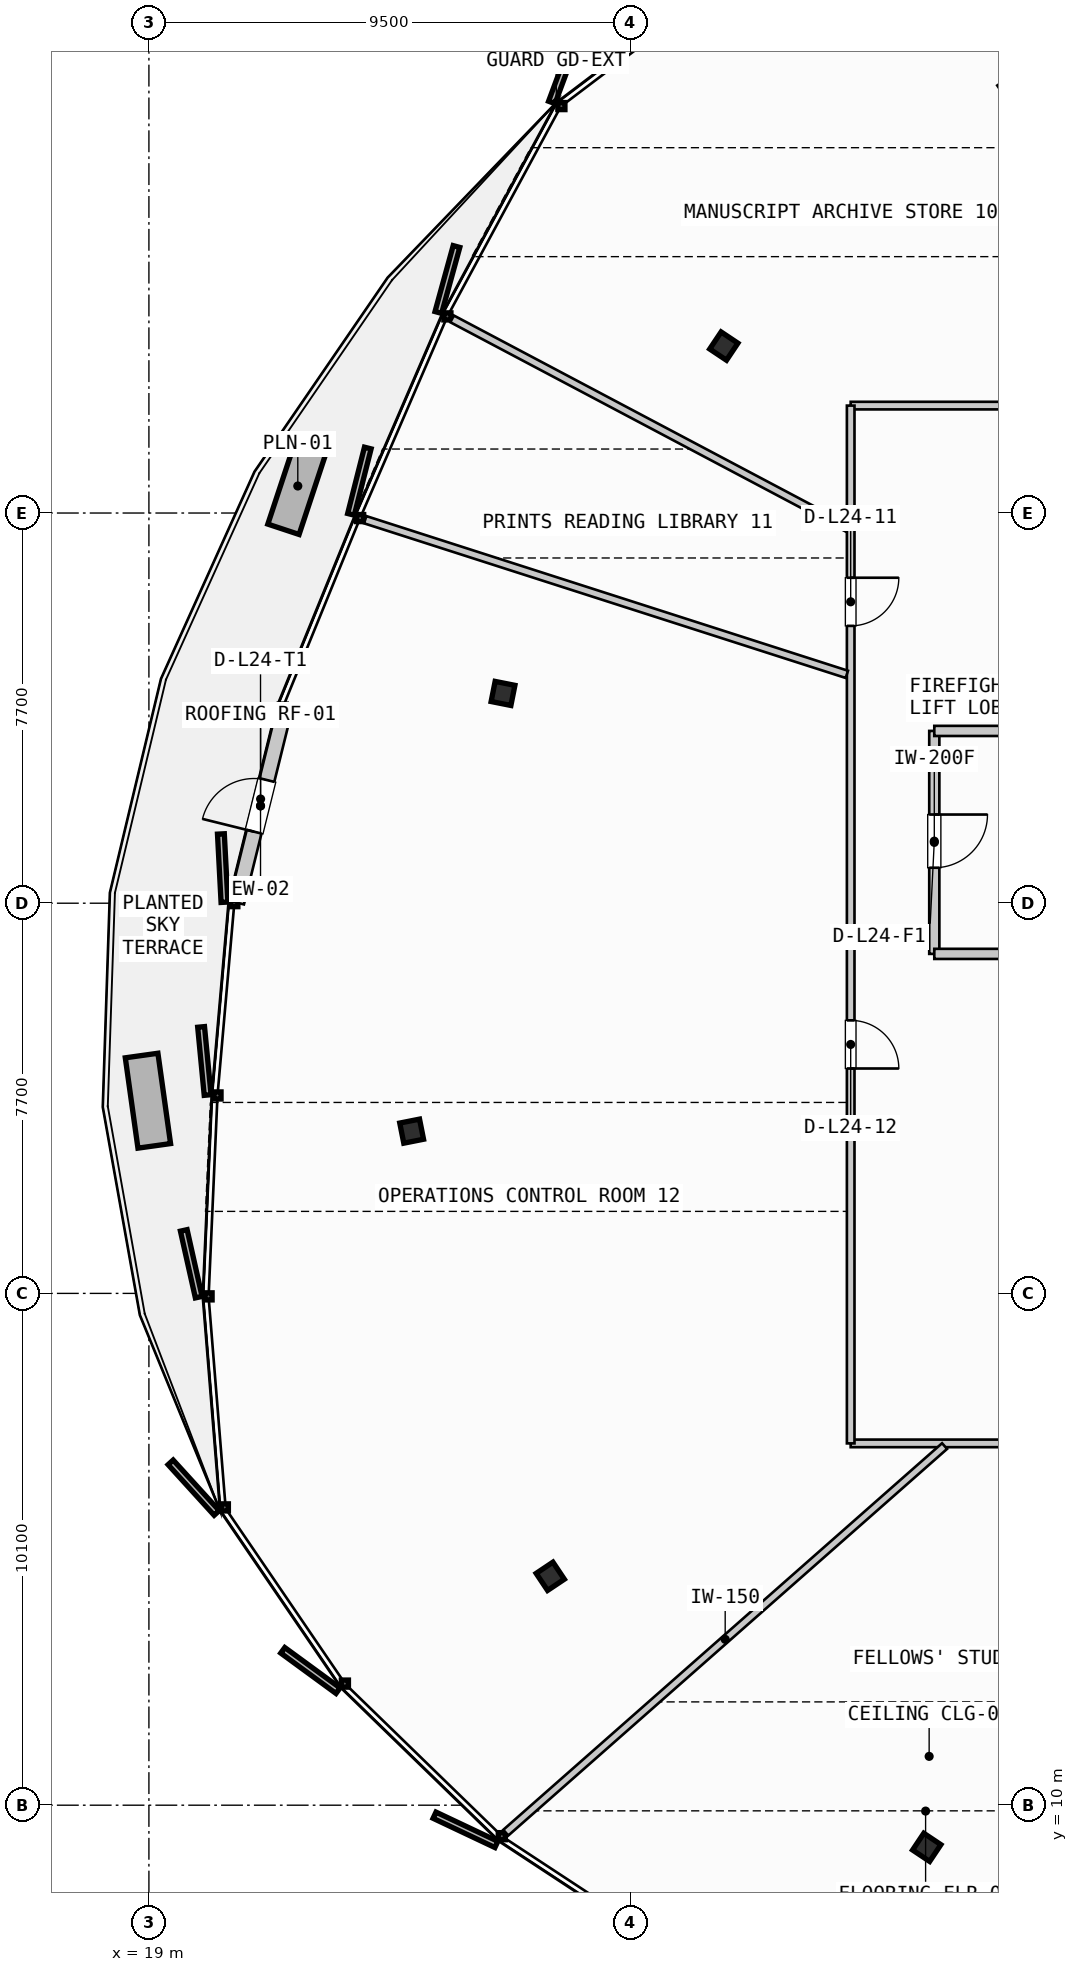
"""IFC4 building model, lengths in metres.
Left out: names, types, materials, properties, quantities, classifications, styles, units other than length and angle.
Written with IfcOpenShell. Run it as: python <this file> out.ifc"""

import sys

from ifc_helpers import new_model, si_unit, direction, frame, frame_2d, origin, origin_2d, place, context, subcontext, project, spatial, rectangle, i_section, extrude, source, transform, mapped, element, fill, save


model = new_model("IFC4")
c1 = context("Model", 3, precision=1e-05, world=origin(), true_north=direction((0.0, 1.0)))
c2 = subcontext(c1, "Body", "Model", "MODEL_VIEW")
j1 = project(units=[si_unit("LENGTHUNIT", "METRE"), si_unit("PLANEANGLEUNIT", "RADIAN")], contexts=[c1])
p1 = place(None, origin())
s1 = spatial("IfcSite", under=j1, at=p1, CompositionType="ELEMENT")
p2 = place(p1, origin())
s2 = spatial("IfcBuilding", under=s1, at=p2, CompositionType="ELEMENT")
p3 = place(p2, frame((0.0, 0.0, 100.0)))
s3 = spatial("IfcBuildingStorey", under=s2, at=p3, CompositionType="ELEMENT", Elevation=100.0)
m1 = source(origin(), c2, "Body", "SweptSolid", [
    extrude(i_section(OverallWidth=0.405, OverallDepth=0.398, WebThickness=0.035, FlangeThickness=0.056, FilletRadius=0.015, at=origin_2d()), origin(), (0.0, 0.0, 1.0), 3.35),
])
for number, where, z_axis, x_axis in (
    (1, (30.346, 38.794, 0.0), (0.0, 0.0, 1.0), (-0.831, 0.556, 0.0)),
    (2, (25.989, 31.94, 0.0), (0.0, 0.0, 1.0), (-0.981, 0.195, 0.0)),
    (3, (24.185, 23.302, 0.0), (0.0, 0.0, 1.0), (-0.981, -0.195, 0.0)),
    (4, (26.921, 14.517, 0.0), (0.0, 0.0, 1.0), (-0.831, -0.556, 0.0)),
    (5, (34.351, 9.168, 0.0), (0.0, 0.0, 1.0), (-0.556, -0.831, 0.0)),
):
    element("IfcColumn", number, at=place(p3, frame(where, z_axis=z_axis, x_axis=x_axis)), inside=s3, PredefinedType="COLUMN", context=c2, shape_type="MappedRepresentation", body=[
        mapped(m1, transform((0.0, 0.0, 0.0), scale=1.0)),
    ])
p4 = place(p3, frame((20.73, 27.812, 0.0), z_axis=(0.0, 0.0, 1.0), x_axis=(0.240490163951, 0.970651575512, 0.0)))
e6 = element("IfcWall", 6, at=p4, inside=s3, PredefinedType="SOLIDWALL", context=c2, shape_type="SweptSolid", body=[
    extrude(rectangle(XDim=3.933, YDim=0.3, at=frame_2d((1.966, 0.0))), origin(), (0.0, 0.0, 1.0), 2.775),
])
p5 = place(p4, frame((1.441, 0.0, 0.0)))
e7 = element("IfcOpeningElement", 7, at=p5, cuts=e6, PredefinedType="OPENING", context=c2, shape_type="SweptSolid", body=[
    extrude(rectangle(XDim=1.05, YDim=2.2, at=frame_2d((0.525, 1.1))), frame((0.0, 0.16, 0.0), z_axis=(0.0, -1.0, 0.0), x_axis=(1.0, 0.0, 0.0)), (0.0, 0.0, 1.0), 0.32),
])
p6 = place(p3, frame((34.5, 31.2, 0.0), z_axis=(0.0, 0.0, 1.0), x_axis=(0.0, -1.0, 0.0)))
e8 = element("IfcWall", 8, at=p6, inside=s3, PredefinedType="PARTITIONING", context=c2, shape_type="SweptSolid", body=[
    extrude(rectangle(XDim=4.4, YDim=0.2, at=frame_2d((2.2, 0.0))), origin(), (0.0, 0.0, 1.0), 2.28),
])
p7 = place(p6, frame((1.65, 0.0, 0.0)))
e9 = element("IfcOpeningElement", 9, at=p7, cuts=e8, PredefinedType="OPENING", context=c2, shape_type="SweptSolid", body=[
    extrude(rectangle(XDim=1.05, YDim=2.15, at=frame_2d((0.525, 1.075))), frame((0.0, 0.11, 0.0), z_axis=(0.0, -1.0, 0.0), x_axis=(1.0, 0.0, 0.0)), (0.0, 0.0, 1.0), 0.22),
])
for number, where, z_axis, x_axis in (
    (10, (34.5, 26.8, 0.0), (0.0, 0.0, 1.0), (1.0, 0.0, 0.0)),
    (11, (34.5, 31.2, 0.0), (0.0, 0.0, 1.0), (1.0, 0.0, 0.0)),
):
    element("IfcWall", number, at=place(p3, frame(where, z_axis=z_axis, x_axis=x_axis)), inside=s3, PredefinedType="PARTITIONING", context=c2, shape_type="SweptSolid", body=[
        extrude(rectangle(XDim=3.215, YDim=0.2, at=frame_2d((1.607, 0.0))), origin(), (0.0, 0.0, 1.0), 2.28),
    ])
p8 = place(p3, frame((32.85, 17.14, 0.0), z_axis=(0.0, 0.0, 1.0), x_axis=(1.0, 0.0, 0.0)))
e12 = element("IfcWall", 12, at=p8, inside=s3, PredefinedType="PARTITIONING", context=c2, shape_type="SweptSolid", body=[
    extrude(rectangle(XDim=28.42, YDim=0.15, at=frame_2d((14.21, 0.0))), origin(), (0.0, 0.0, 1.0), 2.28),
])
p9 = place(p8, frame((5.554, 0.0, 0.0)))
e13 = element("IfcOpeningElement", 13, at=p9, cuts=e12, PredefinedType="OPENING", context=c2, shape_type="SweptSolid", body=[
    extrude(rectangle(XDim=0.95, YDim=2.15, at=frame_2d((0.475, 1.075))), frame((0.0, 0.085, 0.0), z_axis=(0.0, -1.0, 0.0), x_axis=(1.0, 0.0, 0.0)), (0.0, 0.0, 1.0), 0.17),
])
p10 = place(p8, frame((13.191, 0.0, 0.0)))
e14 = element("IfcOpeningElement", 14, at=p10, cuts=e12, PredefinedType="OPENING", context=c2, shape_type="SweptSolid", body=[
    extrude(rectangle(XDim=0.95, YDim=2.15, at=frame_2d((0.475, 1.075))), frame((0.0, 0.085, 0.0), z_axis=(0.0, -1.0, 0.0), x_axis=(1.0, 0.0, 0.0)), (0.0, 0.0, 1.0), 0.17),
])
p11 = place(p8, frame((21.967, 0.0, 0.0)))
e15 = element("IfcOpeningElement", 15, at=p11, cuts=e12, PredefinedType="OPENING", context=c2, shape_type="SweptSolid", body=[
    extrude(rectangle(XDim=0.95, YDim=2.15, at=frame_2d((0.475, 1.075))), frame((0.0, 0.085, 0.0), z_axis=(0.0, -1.0, 0.0), x_axis=(1.0, 0.0, 0.0)), (0.0, 0.0, 1.0), 0.17),
])
p12 = place(p3, frame((61.27, 37.62, 0.0), z_axis=(0.0, 0.0, 1.0), x_axis=(-1.0, 0.0, 0.0)))
e16 = element("IfcWall", 16, at=p12, inside=s3, PredefinedType="PARTITIONING", context=c2, shape_type="SweptSolid", body=[
    extrude(rectangle(XDim=28.42, YDim=0.15, at=frame_2d((14.21, 0.0))), origin(), (0.0, 0.0, 1.0), 2.28),
])
p13 = place(p12, frame((4.139, 0.0, 0.0)))
e17 = element("IfcOpeningElement", 17, at=p13, cuts=e16, PredefinedType="OPENING", context=c2, shape_type="SweptSolid", body=[
    extrude(rectangle(XDim=0.95, YDim=2.15, at=frame_2d((0.475, 1.075))), frame((0.0, 0.085, 0.0), z_axis=(0.0, -1.0, 0.0), x_axis=(1.0, 0.0, 0.0)), (0.0, 0.0, 1.0), 0.17),
])
p14 = place(p12, frame((11.405, 0.0, 0.0)))
e18 = element("IfcOpeningElement", 18, at=p14, cuts=e16, PredefinedType="OPENING", context=c2, shape_type="SweptSolid", body=[
    extrude(rectangle(XDim=0.95, YDim=2.15, at=frame_2d((0.475, 1.075))), frame((0.0, 0.085, 0.0), z_axis=(0.0, -1.0, 0.0), x_axis=(1.0, 0.0, 0.0)), (0.0, 0.0, 1.0), 0.17),
])
p15 = place(p12, frame((17.005, 0.0, 0.0)))
e19 = element("IfcOpeningElement", 19, at=p15, cuts=e16, PredefinedType="OPENING", context=c2, shape_type="SweptSolid", body=[
    extrude(rectangle(XDim=0.95, YDim=2.15, at=frame_2d((0.475, 1.075))), frame((0.0, 0.085, 0.0), z_axis=(0.0, -1.0, 0.0), x_axis=(1.0, 0.0, 0.0)), (0.0, 0.0, 1.0), 0.17),
])
p16 = place(p12, frame((23.328, 0.0, 0.0)))
e20 = element("IfcOpeningElement", 20, at=p16, cuts=e16, PredefinedType="OPENING", context=c2, shape_type="SweptSolid", body=[
    extrude(rectangle(XDim=0.95, YDim=2.15, at=frame_2d((0.475, 1.075))), frame((0.0, 0.085, 0.0), z_axis=(0.0, -1.0, 0.0), x_axis=(1.0, 0.0, 0.0)), (0.0, 0.0, 1.0), 0.17),
])
p17 = place(p3, frame((32.85, 37.62, 0.0), z_axis=(0.0, 0.0, 1.0), x_axis=(0.0, -1.0, 0.0)))
e21 = element("IfcWall", 21, at=p17, inside=s3, PredefinedType="PARTITIONING", context=c2, shape_type="SweptSolid", body=[
    extrude(rectangle(XDim=20.48, YDim=0.15, at=frame_2d((10.24, 0.0))), origin(), (0.0, 0.0, 1.0), 2.28),
])
p18 = place(p17, frame((3.397, 0.0, 0.0)))
e22 = element("IfcOpeningElement", 22, at=p18, cuts=e21, PredefinedType="OPENING", context=c2, shape_type="SweptSolid", body=[
    extrude(rectangle(XDim=0.95, YDim=2.15, at=frame_2d((0.475, 1.075))), frame((0.0, 0.085, 0.0), z_axis=(0.0, -1.0, 0.0), x_axis=(1.0, 0.0, 0.0)), (0.0, 0.0, 1.0), 0.17),
])
p19 = place(p17, frame((12.132, 0.0, 0.0)))
e23 = element("IfcOpeningElement", 23, at=p19, cuts=e21, PredefinedType="OPENING", context=c2, shape_type="SweptSolid", body=[
    extrude(rectangle(XDim=0.95, YDim=2.15, at=frame_2d((0.475, 1.075))), frame((0.0, 0.085, 0.0), z_axis=(0.0, -1.0, 0.0), x_axis=(1.0, 0.0, 0.0)), (0.0, 0.0, 1.0), 0.17),
])
p20 = place(p3, frame((34.703, 17.087, 0.0), z_axis=(0.0, 0.0, 1.0), x_axis=(-0.750332761991, -0.661060319701, 0.0)))
e24 = element("IfcWall", 24, at=p20, inside=s3, PredefinedType="PARTITIONING", context=c2, shape_type="SweptSolid", body=[
    extrude(rectangle(XDim=11.541, YDim=0.15, at=frame_2d((5.771, 0.0))), origin(), (0.0, 0.0, 1.0), 2.28),
])
p21 = place(p3, frame((41.466, 37.69, 0.0), z_axis=(0.0, 0.0, 1.0), x_axis=(-0.474648473647, 0.880175452091, 0.0)))
e25 = element("IfcWall", 25, at=p21, inside=s3, PredefinedType="PARTITIONING", context=c2, shape_type="SweptSolid", body=[
    extrude(rectangle(XDim=12.602, YDim=0.15, at=frame_2d((6.301, 0.0))), origin(), (0.0, 0.0, 1.0), 2.28),
])
p22 = place(p3, frame((32.779, 35.205, 0.0), z_axis=(0.0, 0.0, 1.0), x_axis=(-0.883812825264, 0.467840667213, 0.0)))
e26 = element("IfcWall", 26, at=p22, inside=s3, PredefinedType="PARTITIONING", context=c2, shape_type="SweptSolid", body=[
    extrude(rectangle(XDim=8.821, YDim=0.15, at=frame_2d((4.41, 0.0))), origin(), (0.0, 0.0, 1.0), 2.28),
])
p23 = place(p3, frame((32.774, 32.316, 0.0), z_axis=(0.0, 0.0, 1.0), x_axis=(-0.952129526553, 0.30569488819, 0.0)))
e27 = element("IfcWall", 27, at=p23, inside=s3, PredefinedType="PARTITIONING", context=c2, shape_type="SweptSolid", body=[
    extrude(rectangle(XDim=9.983, YDim=0.15, at=frame_2d((4.991, 0.0))), origin(), (0.0, 0.0, 1.0), 2.28),
])
m2 = source(origin(), c2, "Body", "SweptSolid", [
    extrude(rectangle(XDim=1.05, YDim=2.2, at=frame_2d((0.525, 1.1))), frame((0.0, 0.025, 0.0), z_axis=(0.0, -1.0, 0.0), x_axis=(1.0, 0.0, 0.0)), (0.0, 0.0, 1.0), 0.05),
])
p24 = place(p5, origin())
e28 = element("IfcDoor", 28, at=p24, inside=s3, OperationType="SINGLE_SWING_LEFT", PredefinedType="DOOR", context=c2, shape_type="MappedRepresentation", body=[
    mapped(m2, transform((0.0, 0.0, 0.0), scale=1.0)),
])
fill(e7, e28)
m3 = source(origin(), c2, "Body", "SweptSolid", [
    extrude(rectangle(XDim=1.05, YDim=2.15, at=frame_2d((0.525, 1.075))), frame((0.0, 0.025, 0.0), z_axis=(0.0, -1.0, 0.0), x_axis=(1.0, 0.0, 0.0)), (0.0, 0.0, 1.0), 0.05),
])
p25 = place(p7, origin())
e29 = element("IfcDoor", 29, at=p25, inside=s3, OperationType="SINGLE_SWING_LEFT", PredefinedType="DOOR", context=c2, shape_type="MappedRepresentation", body=[
    mapped(m3, transform((0.0, 0.0, 0.0), scale=1.0)),
])
fill(e9, e29)
m4 = source(origin(), c2, "Body", "SweptSolid", [
    extrude(rectangle(XDim=0.95, YDim=2.15, at=frame_2d((0.475, 1.075))), frame((0.0, 0.025, 0.0), z_axis=(0.0, -1.0, 0.0), x_axis=(1.0, 0.0, 0.0)), (0.0, 0.0, 1.0), 0.05),
])
p26 = place(p18, origin())
e30 = element("IfcDoor", 30, at=p26, inside=s3, OperationType="SINGLE_SWING_LEFT", PredefinedType="DOOR", context=c2, shape_type="MappedRepresentation", body=[
    mapped(m4, transform((0.0, 0.0, 0.0), scale=1.0)),
])
fill(e22, e30)
p27 = place(p19, origin())
e31 = element("IfcDoor", 31, at=p27, inside=s3, OperationType="SINGLE_SWING_RIGHT", PredefinedType="DOOR", context=c2, shape_type="MappedRepresentation", body=[
    mapped(m4, transform((0.0, 0.0, 0.0), scale=1.0)),
])
fill(e23, e31)
save(model, sys.argv[1])
